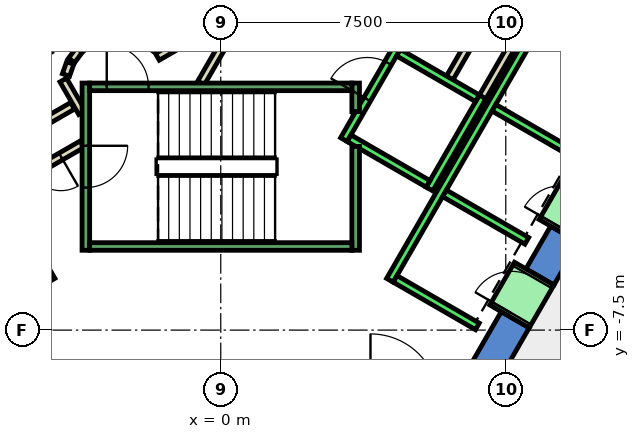
"""IFC4 building model, lengths in metres.
Left out: names, types, materials, properties, quantities, classifications, styles, units other than length and angle.
Written with IfcOpenShell. Run it as: python <this file> out.ifc"""

import sys

from ifc_helpers import new_model, si_unit, direction, frame, frame_2d, origin, place, context, subcontext, project, spatial, polyline, rectangle, outline, extrude, element, fill, save


model = new_model("IFC4")
c1 = context("Model", 3, precision=1e-05, world=origin(), true_north=direction((0.0, 1.0)))
c2 = subcontext(c1, "Body", "Model", "MODEL_VIEW")
j1 = project(units=[si_unit("LENGTHUNIT", "METRE"), si_unit("PLANEANGLEUNIT", "RADIAN")], contexts=[c1])
p1 = place(None, origin())
s1 = spatial("IfcSite", under=j1, at=p1, CompositionType="ELEMENT")
p2 = place(p1, origin())
s2 = spatial("IfcBuilding", under=s1, at=p2, CompositionType="ELEMENT")
p3 = place(p2, frame((0.0, 0.0, 128.6)))
s3 = spatial("IfcBuildingStorey", under=s2, at=p3, CompositionType="ELEMENT", Elevation=128.6)
p4 = place(p3, frame((0.0, 0.0, -0.4)))
e1 = element("IfcWall", 1, at=p4, inside=s3, PredefinedType="SHEAR", context=c2, shape_type="SweptSolid", body=[
    extrude(outline(polyline([(8.117, -7.44), (7.381, -7.015), (6.437, -8.65), (6.928, -9.5), (8.117, -7.44)])), origin(), (0.0, 0.0, 1.0), 4.0),
])
p5 = place(p3, frame((0.0, 0.0, -0.4)))
e2 = element("IfcWall", 2, at=p5, inside=s3, PredefinedType="SHEAR", context=c2, shape_type="SweptSolid", body=[
    extrude(outline(polyline([(9.417, -5.189), (8.681, -4.764), (8.031, -5.889), (8.767, -6.314), (9.417, -5.189)])), origin(), (0.0, 0.0, 1.0), 4.0),
])
p6 = place(p3, frame((6.826, 0.522, 0.0), z_axis=(0.0, 0.0, 1.0), x_axis=(-0.500016722714, -0.866015748706, 0.0)))
e3 = element("IfcWall", 3, at=p6, inside=s3, PredefinedType="PARTITIONING", context=c2, shape_type="SweptSolid", body=[
    extrude(rectangle(XDim=1.7, YDim=0.2, at=frame_2d((0.85, 0.0))), origin(), (0.0, 0.0, 1.0), 3.6),
])
p7 = place(p3, frame((8.192, 0.888, 0.0), z_axis=(0.0, 0.0, 1.0), x_axis=(-0.499940625693, -0.866059680843, 0.0)))
e4 = element("IfcWall", 4, at=p7, inside=s3, PredefinedType="PARTITIONING", context=c2, shape_type="SweptSolid", body=[
    extrude(rectangle(XDim=2.68, YDim=0.2, at=frame_2d((1.34, 0.0))), origin(), (0.0, 0.0, 1.0), 3.6),
])
p8 = place(p3, frame((-3.9, -1.599, 0.0), z_axis=(0.0, 0.0, 1.0), x_axis=(-0.865969445389, -0.500096910261, 0.0)))
e5 = element("IfcWall", 5, at=p8, inside=s3, PredefinedType="PARTITIONING", context=c2, shape_type="SweptSolid", body=[
    extrude(rectangle(XDim=1.373, YDim=0.2, at=frame_2d((0.687, 0.0))), origin(), (0.0, 0.0, 1.0), 3.6),
])
p9 = place(p3, frame((-3.65, -2.61, 0.0), z_axis=(0.0, 0.0, 1.0), x_axis=(-0.866072462134, -0.499918483688, 0.0)))
e6 = element("IfcWall", 6, at=p9, inside=s3, PredefinedType="PARTITIONING", context=c2, shape_type="SweptSolid", body=[
    extrude(rectangle(XDim=2.084, YDim=0.2, at=frame_2d((1.042, 0.0))), origin(), (0.0, 0.0, 1.0), 3.6),
])
p10 = place(p9, frame((0.642, 0.0, 0.0)))
e7 = element("IfcOpeningElement", 7, at=p10, cuts=e6, PredefinedType="OPENING", context=c2, shape_type="SweptSolid", body=[
    extrude(rectangle(XDim=0.9, YDim=2.1, at=frame_2d((0.45, 1.05))), frame((0.0, 0.11, 0.0), z_axis=(0.0, -1.0, 0.0), x_axis=(1.0, 0.0, 0.0)), (0.0, 0.0, 1.0), 0.22),
])
p11 = place(p3, frame((-4.145, -0.92, 0.0), z_axis=(0.0, 0.0, 1.0), x_axis=(0.499743786207, -0.866173278362, 0.0)))
e8 = element("IfcWall", 8, at=p11, inside=s3, PredefinedType="PARTITIONING", context=c2, shape_type="SweptSolid", body=[
    extrude(rectangle(XDim=0.991, YDim=0.2, at=frame_2d((0.495, 0.0))), origin(), (0.0, 0.0, 1.0), 3.6),
])
p12 = place(p3, frame((-0.52, -1.0, 0.0), z_axis=(0.0, 0.0, 1.0), x_axis=(0.50011622646, 0.865958290007, 0.0)))
e9 = element("IfcWall", 9, at=p12, inside=s3, PredefinedType="PARTITIONING", context=c2, shape_type="SweptSolid", body=[
    extrude(rectangle(XDim=4.991, YDim=0.2, at=frame_2d((2.496, 0.0))), origin(), (0.0, 0.0, 1.0), 3.6),
])
p13 = place(p12, frame((1.945, 0.0, 0.0)))
e10 = element("IfcOpeningElement", 10, at=p13, cuts=e9, PredefinedType="OPENING", context=c2, shape_type="SweptSolid", body=[
    extrude(rectangle(XDim=1.0, YDim=2.1, at=frame_2d((0.5, 1.05))), frame((0.0, 0.11, 0.0), z_axis=(0.0, -1.0, 0.0), x_axis=(1.0, 0.0, 0.0)), (0.0, 0.0, 1.0), 0.22),
])
p14 = place(p3, frame((-0.412, 0.414, 0.0), z_axis=(0.0, 0.0, 1.0), x_axis=(-0.866017369001, -0.500013916395, 0.0)))
e11 = element("IfcWall", 11, at=p14, inside=s3, PredefinedType="PARTITIONING", context=c2, shape_type="SweptSolid", body=[
    extrude(rectangle(XDim=1.45, YDim=0.2, at=frame_2d((0.725, 0.0))), origin(), (0.0, 0.0, 1.0), 3.6),
])
p15 = place(p3, frame((-3.723, -0.131, 0.0), z_axis=(0.0, 0.0, 1.0), x_axis=(-0.594675113454, -0.803966112121, 0.0)))
e12 = element("IfcWall", 12, at=p15, inside=s3, PredefinedType="PARTITIONING", context=c2, shape_type="SweptSolid", body=[
    extrude(rectangle(XDim=0.338, YDim=0.2, at=frame_2d((0.169, 0.0))), origin(), (0.0, 0.0, 1.0), 3.6),
])
p16 = place(p3, frame((-3.96, -0.47, 0.0), z_axis=(0.0, 0.0, 1.0), x_axis=(-0.334824194261, -0.942280615813, 0.0)))
e13 = element("IfcWall", 13, at=p16, inside=s3, PredefinedType="PARTITIONING", context=c2, shape_type="SweptSolid", body=[
    extrude(rectangle(XDim=0.338, YDim=0.2, at=frame_2d((0.169, 0.0))), origin(), (0.0, 0.0, 1.0), 3.6),
])
p17 = place(p3, frame((12.401, -7.621, 0.0), z_axis=(0.0, 0.0, 1.0), x_axis=(-0.499983724212, -0.866034800411, 0.0)))
e14 = element("IfcWall", 14, at=p17, inside=s3, PredefinedType="PARTITIONING", context=c2, shape_type="SweptSolid", body=[
    extrude(rectangle(XDim=9.302, YDim=0.2, at=frame_2d((4.651, 0.0))), origin(), (0.0, 0.0, 1.0), 3.6),
])
p18 = place(p17, frame((0.231, 0.0, 0.0)))
e15 = element("IfcOpeningElement", 15, at=p18, cuts=e14, PredefinedType="OPENING", context=c2, shape_type="SweptSolid", body=[
    extrude(rectangle(XDim=1.0, YDim=2.1, at=frame_2d((0.5, 1.05))), frame((0.0, 0.11, 0.0), z_axis=(0.0, -1.0, 0.0), x_axis=(1.0, 0.0, 0.0)), (0.0, 0.0, 1.0), 0.22),
])
p19 = place(p17, frame((1.331, 0.0, 0.0)))
e16 = element("IfcOpeningElement", 16, at=p19, cuts=e14, PredefinedType="OPENING", context=c2, shape_type="SweptSolid", body=[
    extrude(rectangle(XDim=1.0, YDim=2.1, at=frame_2d((0.5, 1.05))), frame((0.0, 0.11, 0.0), z_axis=(0.0, -1.0, 0.0), x_axis=(1.0, 0.0, 0.0)), (0.0, 0.0, 1.0), 0.22),
])
p20 = place(p3, frame((-9.751, 2.99, 0.0), z_axis=(0.0, 0.0, 1.0), x_axis=(0.50000090737, -0.866024879913, 0.0)))
e17 = element("IfcWall", 17, at=p20, inside=s3, PredefinedType="STANDARD", context=c2, shape_type="SweptSolid", body=[
    extrude(rectangle(XDim=10.6, YDim=0.2, at=frame_2d((5.3, 0.0))), origin(), (0.0, 0.0, 1.0), 3.6),
])
p21 = place(p3, frame((3.24, -2.488, 0.0), z_axis=(0.0, 0.0, 1.0), x_axis=(0.49994636267, 0.866056369097, 0.0)))
e18 = element("IfcWall", 18, at=p21, inside=s3, PredefinedType="STANDARD", context=c2, shape_type="SweptSolid", body=[
    extrude(rectangle(XDim=2.8, YDim=0.2, at=frame_2d((1.4, 0.0))), origin(), (0.0, 0.0, 1.0), 3.6),
])
p22 = place(p21, frame((1.225, 0.0, 0.0)))
e19 = element("IfcOpeningElement", 19, at=p22, cuts=e18, PredefinedType="OPENING", context=c2, shape_type="SweptSolid", body=[
    extrude(rectangle(XDim=1.1, YDim=2.1, at=frame_2d((0.55, 1.05))), frame((0.0, 0.11, 0.0), z_axis=(0.0, -1.0, 0.0), x_axis=(1.0, 0.0, 0.0)), (0.0, 0.0, 1.0), 0.22),
])
p23 = place(p3, frame((5.492, -3.788, 0.0), z_axis=(0.0, 0.0, 1.0), x_axis=(0.500011755427, 0.866018616679, 0.0)))
e20 = element("IfcWall", 20, at=p23, inside=s3, PredefinedType="STANDARD", context=c2, shape_type="SweptSolid", body=[
    extrude(rectangle(XDim=2.8, YDim=0.2, at=frame_2d((1.4, 0.0))), origin(), (0.0, 0.0, 1.0), 3.6),
])
p24 = place(p3, frame((3.377, -2.452, 0.0), z_axis=(0.0, 0.0, 1.0), x_axis=(0.865955154139, -0.50012165622, 0.0)))
e21 = element("IfcWall", 21, at=p24, inside=s3, PredefinedType="STANDARD", context=c2, shape_type="SweptSolid", body=[
    extrude(rectangle(XDim=2.4, YDim=0.2, at=frame_2d((1.2, 0.0))), origin(), (0.0, 0.0, 1.0), 3.6),
])
p25 = place(p3, frame((4.677, -0.2, 0.0), z_axis=(0.0, 0.0, 1.0), x_axis=(0.865973769406, -0.500089422704, 0.0)))
e22 = element("IfcWall", 22, at=p25, inside=s3, PredefinedType="STANDARD", context=c2, shape_type="SweptSolid", body=[
    extrude(rectangle(XDim=2.399, YDim=0.2, at=frame_2d((1.2, 0.0))), origin(), (0.0, 0.0, 1.0), 3.6),
])
p26 = place(p3, frame((4.451, -6.19, 0.0), z_axis=(0.0, 0.0, 1.0), x_axis=(0.50000090737, 0.866024879913, 0.0)))
e23 = element("IfcWall", 23, at=p26, inside=s3, PredefinedType="STANDARD", context=c2, shape_type="SweptSolid", body=[
    extrude(rectangle(XDim=10.6, YDim=0.2, at=frame_2d((5.3, 0.0))), origin(), (0.0, 0.0, 1.0), 3.6),
])
for number, where, z_axis, x_axis in (
    (24, (4.588, -6.153, 0.0), (0.0, 0.0, 1.0), (0.866, -0.5, 0.0)),
    (25, (5.888, -3.902, 0.0), (0.0, 0.0, 1.0), (0.866, -0.5, 0.0)),
    (26, (7.188, -1.65, 0.0), (0.0, 0.0, 1.0), (0.866, -0.5, 0.0)),
    (27, (8.488, 0.602, 0.0), (0.0, 0.0, 1.0), (0.866, -0.5, 0.0)),
):
    element("IfcWall", number, at=place(p3, frame(where, z_axis=z_axis, x_axis=x_axis)), inside=s3, PredefinedType="STANDARD", context=c2, shape_type="SweptSolid", body=[
        extrude(rectangle(XDim=2.5, YDim=0.2, at=frame_2d((1.25, 0.0))), origin(), (0.0, 0.0, 1.0), 3.6),
    ])
p27 = place(p3, frame((7.598, -7.14, 0.0), z_axis=(0.0, 0.0, 1.0), x_axis=(0.500362116554, 0.865816234728, 0.0)))
e28 = element("IfcWall", 28, at=p27, inside=s3, PredefinedType="STANDARD", context=c2, shape_type="SweptSolid", body=[
    extrude(rectangle(XDim=1.299, YDim=1.2, at=frame_2d((0.65, 0.0))), origin(), (0.0, 0.0, 1.0), 2.4),
])
p28 = place(p27, frame((0.1, 0.0, 0.0)))
e29 = element("IfcOpeningElement", 29, at=p28, cuts=e28, PredefinedType="OPENING", context=c2, shape_type="SweptSolid", body=[
    extrude(rectangle(XDim=1.1, YDim=2.3, at=frame_2d((0.55, 1.15))), frame((0.0, 0.61, 0.0), z_axis=(0.0, -1.0, 0.0), x_axis=(1.0, 0.0, 0.0)), (0.0, 0.0, 1.0), 1.22),
])
p29 = place(p3, frame((8.898, -4.889, 0.0), z_axis=(0.0, 0.0, 1.0), x_axis=(0.500036693733, 0.866004217611, 0.0)))
e30 = element("IfcWall", 30, at=p29, inside=s3, PredefinedType="STANDARD", context=c2, shape_type="SweptSolid", body=[
    extrude(rectangle(XDim=1.3, YDim=1.2, at=frame_2d((0.65, 0.0))), origin(), (0.0, 0.0, 1.0), 2.4),
])
p30 = place(p29, frame((0.1, 0.0, 0.0)))
e31 = element("IfcOpeningElement", 31, at=p30, cuts=e30, PredefinedType="OPENING", context=c2, shape_type="SweptSolid", body=[
    extrude(rectangle(XDim=1.1, YDim=2.3, at=frame_2d((0.55, 1.15))), frame((0.0, 0.61, 0.0), z_axis=(0.0, -1.0, 0.0), x_axis=(1.0, 0.0, 0.0)), (0.0, 0.0, 1.0), 1.22),
])
p31 = place(p3, frame((-3.55, -1.0, 0.0), z_axis=(0.0, 0.0, 1.0), x_axis=(0.0, -1.0, 0.0)))
e32 = element("IfcWall", 32, at=p31, inside=s3, PredefinedType="STANDARD", context=c2, shape_type="SweptSolid", body=[
    extrude(rectangle(XDim=4.4, YDim=0.2, at=frame_2d((2.2, 0.0))), origin(), (0.0, 0.0, 1.0), 3.6),
])
p32 = place(p31, frame((1.65, 0.0, 0.0)))
e33 = element("IfcOpeningElement", 33, at=p32, cuts=e32, PredefinedType="OPENING", context=c2, shape_type="SweptSolid", body=[
    extrude(rectangle(XDim=1.1, YDim=2.2, at=frame_2d((0.55, 1.1))), frame((0.0, 0.11, 0.0), z_axis=(0.0, -1.0, 0.0), x_axis=(1.0, 0.0, 0.0)), (0.0, 0.0, 1.0), 0.22),
])
p33 = place(p3, frame((3.55, -2.667, 0.0), z_axis=(0.0, 0.0, 1.0), x_axis=(0.0, -1.0, 0.0)))
e34 = element("IfcWall", 34, at=p33, inside=s3, PredefinedType="STANDARD", context=c2, shape_type="SweptSolid", body=[
    extrude(rectangle(XDim=2.733, YDim=0.2, at=frame_2d((1.366, 0.0))), origin(), (0.0, 0.0, 1.0), 3.6),
])
p34 = place(p3, frame((3.55, -1.0, 0.0), z_axis=(0.0, 0.0, 1.0), x_axis=(0.0, -1.0, 0.0)))
e35 = element("IfcWall", 35, at=p34, inside=s3, PredefinedType="STANDARD", context=c2, shape_type="SweptSolid", body=[
    extrude(rectangle(XDim=0.751, YDim=0.2, at=frame_2d((0.375, 0.0))), origin(), (0.0, 0.0, 1.0), 3.6),
])
p35 = place(p3, frame((-3.45, -1.1, 0.0), z_axis=(0.0, 0.0, 1.0), x_axis=(1.0, 0.0, 0.0)))
e36 = element("IfcWall", 36, at=p35, inside=s3, PredefinedType="STANDARD", context=c2, shape_type="SweptSolid", body=[
    extrude(rectangle(XDim=6.9, YDim=0.2, at=frame_2d((3.45, 0.0))), origin(), (0.0, 0.0, 1.0), 3.6),
])
p36 = place(p35, frame((0.45, 0.0, 0.0)))
e37 = element("IfcOpeningElement", 37, at=p36, cuts=e36, PredefinedType="OPENING", context=c2, shape_type="SweptSolid", body=[
    extrude(rectangle(XDim=1.1, YDim=2.2, at=frame_2d((0.55, 1.1))), frame((0.0, 0.11, 0.0), z_axis=(0.0, -1.0, 0.0), x_axis=(1.0, 0.0, 0.0)), (0.0, 0.0, 1.0), 0.22),
])
p37 = place(p3, frame((-3.45, -5.3, 0.0), z_axis=(0.0, 0.0, 1.0), x_axis=(1.0, 0.0, 0.0)))
e38 = element("IfcWall", 38, at=p37, inside=s3, PredefinedType="STANDARD", context=c2, shape_type="SweptSolid", body=[
    extrude(rectangle(XDim=6.9, YDim=0.2, at=frame_2d((3.45, 0.0))), origin(), (0.0, 0.0, 1.0), 3.6),
])
p38 = place(p10, origin())
e39 = element("IfcDoor", 39, at=p38, inside=s3, OperationType="SINGLE_SWING_LEFT", PredefinedType="DOOR", context=c2, shape_type="SweptSolid", body=[
    extrude(rectangle(XDim=0.9, YDim=2.1, at=frame_2d((0.45, 1.05))), frame((0.0, 0.025, 0.0), z_axis=(0.0, -1.0, 0.0), x_axis=(1.0, 0.0, 0.0)), (0.0, 0.0, 1.0), 0.05),
])
fill(e7, e39)
p39 = place(p28, origin())
e40 = element("IfcDoor", 40, at=p39, inside=s3, OperationType="SLIDING_TO_LEFT", PredefinedType="DOOR", context=c2, shape_type="SweptSolid", body=[
    extrude(rectangle(XDim=1.1, YDim=2.3, at=frame_2d((0.55, 1.15))), frame((0.0, 0.025, 0.0), z_axis=(0.0, -1.0, 0.0), x_axis=(1.0, 0.0, 0.0)), (0.0, 0.0, 1.0), 0.05),
])
fill(e29, e40)
p40 = place(p22, origin())
e41 = element("IfcDoor", 41, at=p40, inside=s3, OperationType="SLIDING_TO_LEFT", PredefinedType="DOOR", context=c2, shape_type="SweptSolid", body=[
    extrude(rectangle(XDim=1.1, YDim=2.1, at=frame_2d((0.55, 1.05))), frame((0.0, 0.025, 0.0), z_axis=(0.0, -1.0, 0.0), x_axis=(1.0, 0.0, 0.0)), (0.0, 0.0, 1.0), 0.05),
])
fill(e19, e41)
p41 = place(p36, origin())
e42 = element("IfcDoor", 42, at=p41, inside=s3, OperationType="SINGLE_SWING_LEFT", PredefinedType="DOOR", context=c2, shape_type="SweptSolid", body=[
    extrude(rectangle(XDim=1.1, YDim=2.2, at=frame_2d((0.55, 1.1))), frame((0.0, 0.025, 0.0), z_axis=(0.0, -1.0, 0.0), x_axis=(1.0, 0.0, 0.0)), (0.0, 0.0, 1.0), 0.05),
])
fill(e37, e42)
p42 = place(p32, origin())
e43 = element("IfcDoor", 43, at=p42, inside=s3, OperationType="SINGLE_SWING_LEFT", PredefinedType="DOOR", context=c2, shape_type="SweptSolid", body=[
    extrude(rectangle(XDim=1.1, YDim=2.2, at=frame_2d((0.55, 1.1))), frame((0.0, 0.025, 0.0), z_axis=(0.0, -1.0, 0.0), x_axis=(1.0, 0.0, 0.0)), (0.0, 0.0, 1.0), 0.05),
])
fill(e33, e43)
save(model, sys.argv[1])
